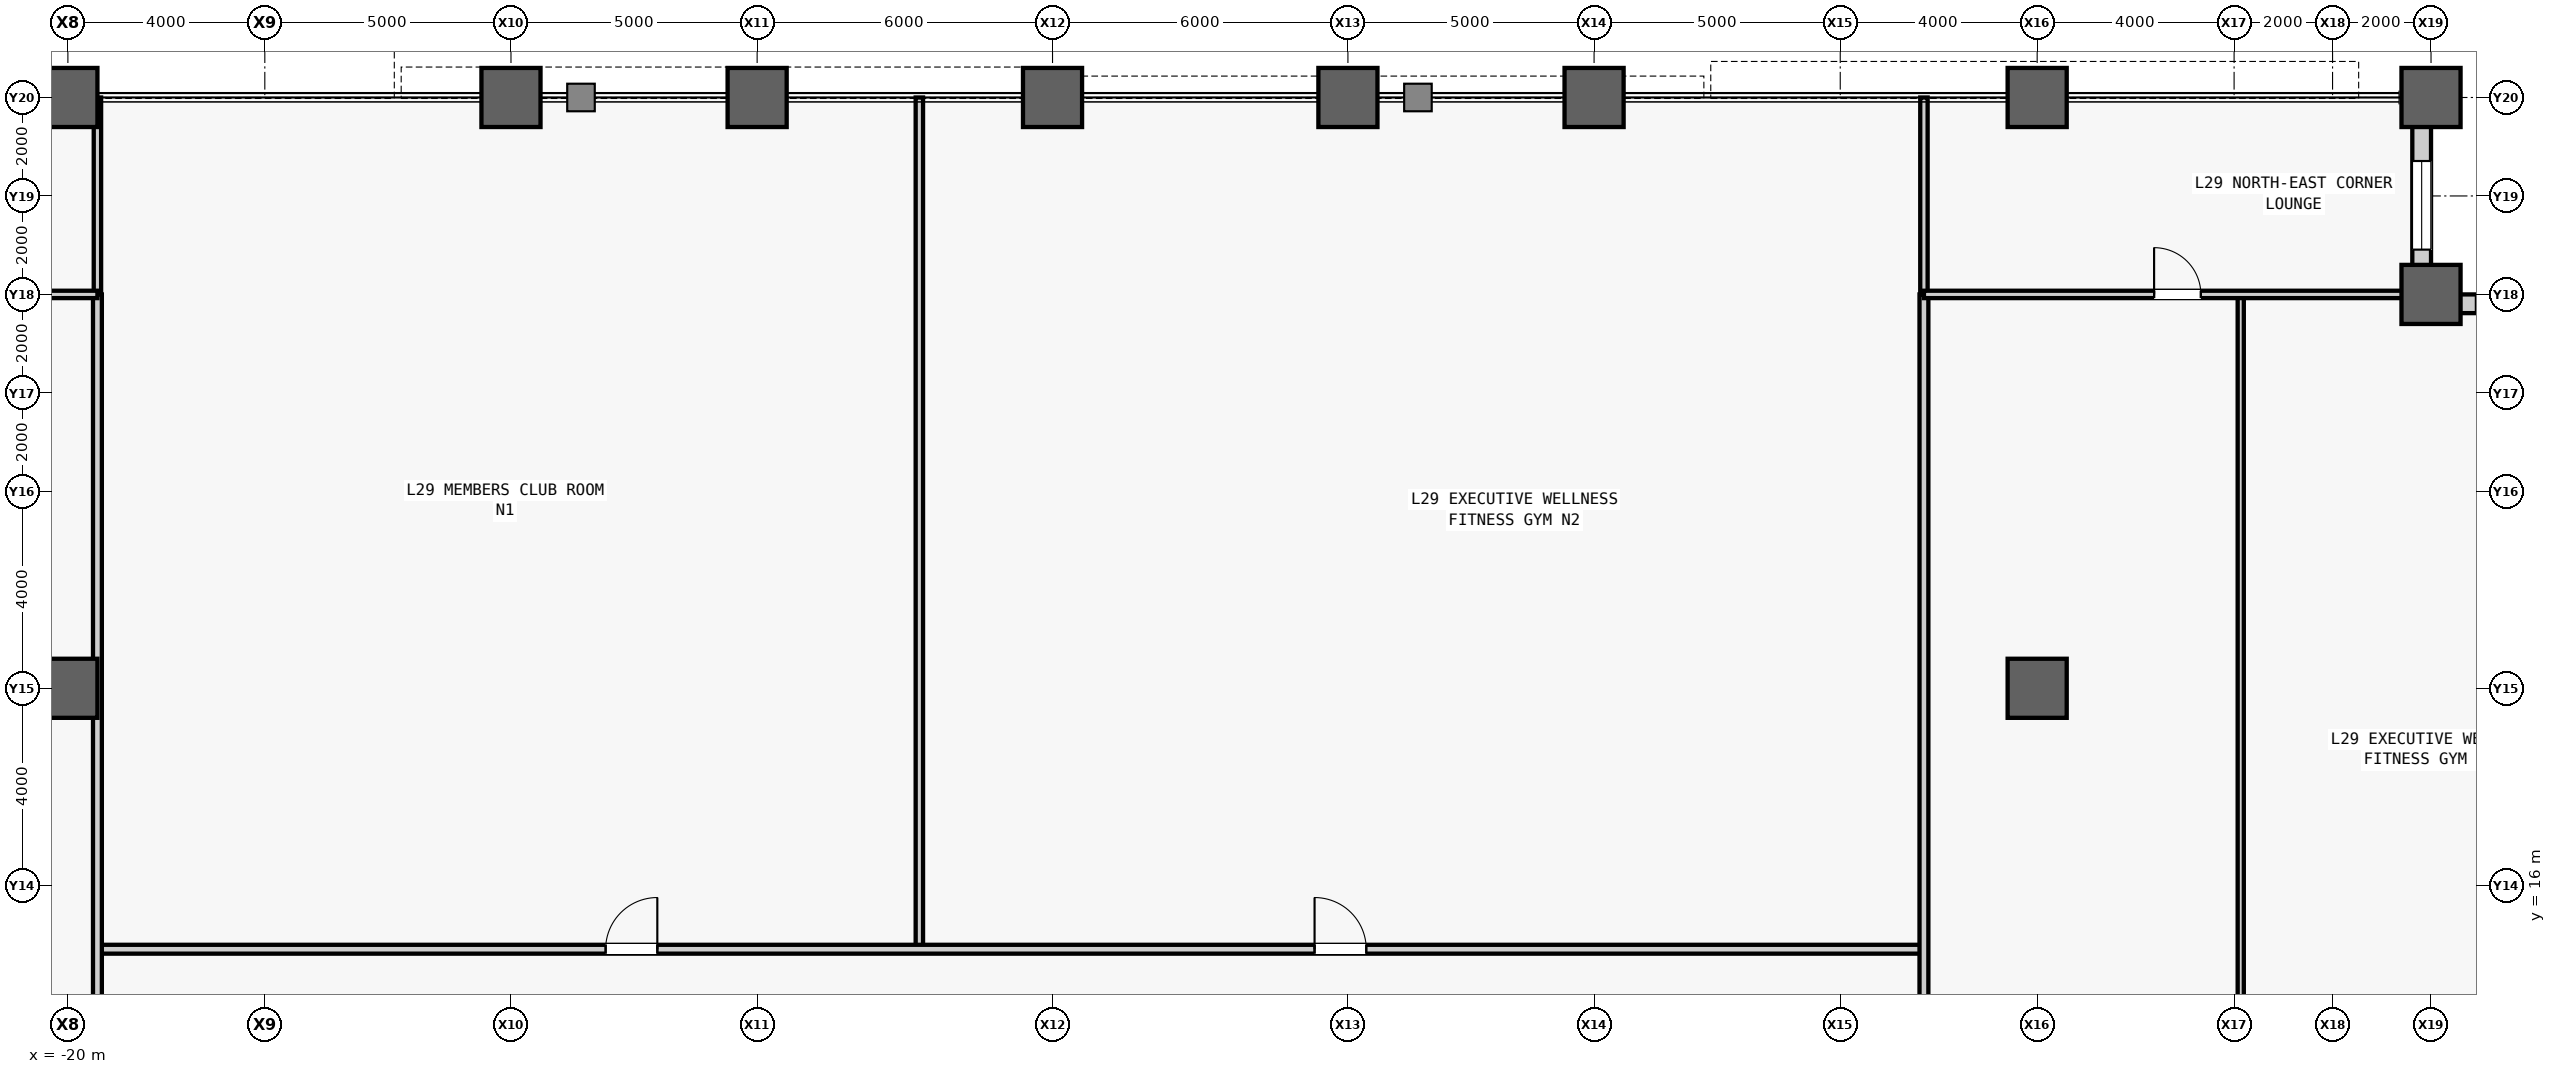
"""IFC4 building model, lengths in metres.
Left out: names, types, materials, properties, quantities, classifications, styles, units other than length and angle.
Written with IfcOpenShell. Run it as: python <this file> out.ifc"""

import sys

from ifc_helpers import new_model, si_unit, direction, frame, frame_2d, origin, origin_2d, place, context, subcontext, project, spatial, rectangle, hollow_rectangle, extrude, source, transform, mapped, element, fill, save


model = new_model("IFC4")
c1 = context("Model", 3, precision=1e-05, world=origin(), true_north=direction((0.0, 1.0)))
c2 = subcontext(c1, "Body", "Model", "MODEL_VIEW")
j1 = project(units=[si_unit("LENGTHUNIT", "METRE"), si_unit("PLANEANGLEUNIT", "RADIAN")], contexts=[c1])
p1 = place(None, origin())
s1 = spatial("IfcSite", under=j1, at=p1, CompositionType="ELEMENT")
p2 = place(p1, origin())
s2 = spatial("IfcBuilding", under=s1, at=p2, CompositionType="ELEMENT")
p3 = place(p2, frame((0.0, 0.0, 128.3)))
s3 = spatial("IfcBuildingStorey", under=s2, at=p3, CompositionType="ELEMENT", Elevation=128.3)
m1 = source(origin(), c2, "Body", "SweptSolid", [
    extrude(hollow_rectangle(XDim=1.2, YDim=1.2, WallThickness=0.07, at=origin_2d()), origin(), (0.0, 0.0, 1.0), 4.1),
])
for number, where, z_axis, x_axis in (
    (1, (-20.0, 20.0, 0.0), (0.0, 0.0, 1.0), (1.0, 0.0, 0.0)),
    (2, (-20.0, 32.0, 0.0), (0.0, 0.0, 1.0), (1.0, 0.0, 0.0)),
    (3, (-11.0, 32.0, 0.0), (0.0, 0.0, 1.0), (1.0, 0.0, 0.0)),
    (4, (-6.0, 32.0, 0.0), (0.0, 0.0, 1.0), (1.0, 0.0, 0.0)),
    (5, (0.0, 32.0, 0.0), (0.0, 0.0, 1.0), (1.0, 0.0, 0.0)),
    (6, (6.0, 32.0, 0.0), (0.0, 0.0, 1.0), (1.0, 0.0, 0.0)),
    (7, (11.0, 32.0, 0.0), (0.0, 0.0, 1.0), (1.0, 0.0, 0.0)),
    (8, (20.0, 20.0, 0.0), (0.0, 0.0, 1.0), (1.0, 0.0, 0.0)),
    (9, (20.0, 32.0, 0.0), (0.0, 0.0, 1.0), (1.0, 0.0, 0.0)),
    (10, (28.0, 28.0, 0.0), (0.0, 0.0, 1.0), (1.0, 0.0, 0.0)),
    (11, (28.0, 32.0, 0.0), (0.0, 0.0, 1.0), (1.0, 0.0, 0.0)),
):
    element("IfcColumn", number, at=place(p3, frame(where, z_axis=z_axis, x_axis=x_axis)), inside=s3, PredefinedType="COLUMN", context=c2, shape_type="MappedRepresentation", body=[
        mapped(m1, transform((0.0, 0.0, 0.0), scale=1.0)),
    ])
m2 = source(origin(), c2, "Body", "SweptSolid", [
    extrude(rectangle(XDim=3.62, YDim=0.38, at=frame_2d((1.81, 0.0))), origin(), (0.0, 0.0, 1.0), 3.145),
])
p4 = place(p3, frame((28.0, 27.81, 0.0), z_axis=(0.0, 0.0, 1.0), x_axis=(1.0, 0.0, 0.0)))
e12 = element("IfcWall", 12, at=p4, inside=s3, PredefinedType="STANDARD", context=c2, shape_type="MappedRepresentation", body=[
    mapped(m2, transform((0.0, 0.0, 0.0), scale=1.0)),
])
m3 = source(origin(), c2, "Body", "SweptSolid", [
    extrude(rectangle(XDim=1.8, YDim=2.4, at=frame_2d((0.9, 1.2))), frame((0.0, 0.2, 0.0), z_axis=(0.0, -1.0, 0.0), x_axis=(1.0, 0.0, 0.0)), (0.0, 0.0, 1.0), 0.4),
])
p5 = place(p4, frame((0.91, 0.0, 0.5)))
e13 = element("IfcOpeningElement", 13, at=p5, cuts=e12, PredefinedType="OPENING", context=c2, shape_type="MappedRepresentation", body=[
    mapped(m3, transform((0.0, 0.0, 0.0), scale=1.0)),
])
p6 = place(p3, frame((27.81, 28.0, 0.0), z_axis=(0.0, 0.0, 1.0), x_axis=(0.0, 1.0, 0.0)))
e14 = element("IfcWall", 14, at=p6, inside=s3, PredefinedType="STANDARD", context=c2, shape_type="MappedRepresentation", body=[
    mapped(m2, transform((0.0, 0.0, 0.0), scale=1.0)),
])
p7 = place(p6, frame((0.91, 0.0, 0.5)))
e15 = element("IfcOpeningElement", 15, at=p7, cuts=e14, PredefinedType="OPENING", context=c2, shape_type="MappedRepresentation", body=[
    mapped(m3, transform((0.0, 0.0, 0.0), scale=1.0)),
])
m4 = source(origin(), c2, "Body", "SweptSolid", [
    extrude(rectangle(XDim=17.3, YDim=0.15, at=frame_2d((8.65, 0.0))), origin(), (0.0, 0.0, 1.0), 3.84),
])
p8 = place(p3, frame((-2.705, 14.7, 0.0), z_axis=(0.0, 0.0, 1.0), x_axis=(0.0, 1.0, 0.0)))
e16 = element("IfcWall", 16, at=p8, inside=s3, PredefinedType="PARTITIONING", context=c2, shape_type="MappedRepresentation", body=[
    mapped(m4, transform((0.0, 0.0, 0.0), scale=1.0)),
])
m5 = source(origin(), c2, "Body", "SweptSolid", [
    extrude(rectangle(XDim=37.1, YDim=0.18, at=frame_2d((18.55, 0.0))), origin(), (0.0, 0.0, 1.0), 3.84),
])
p9 = place(p3, frame((-19.4, 14.7, 0.0), z_axis=(0.0, 0.0, 1.0), x_axis=(1.0, 0.0, 0.0)))
e17 = element("IfcWall", 17, at=p9, inside=s3, PredefinedType="PARTITIONING", context=c2, shape_type="MappedRepresentation", body=[
    mapped(m5, transform((0.0, 0.0, 0.0), scale=1.0)),
])
m6 = source(origin(), c2, "Body", "SweptSolid", [
    extrude(rectangle(XDim=1.05, YDim=2.2, at=frame_2d((0.525, 1.1))), frame((0.0, 0.1, 0.0), z_axis=(0.0, -1.0, 0.0), x_axis=(1.0, 0.0, 0.0)), (0.0, 0.0, 1.0), 0.2),
])
p10 = place(p9, frame((10.323, 0.0, 0.0)))
e18 = element("IfcOpeningElement", 18, at=p10, cuts=e17, PredefinedType="OPENING", context=c2, shape_type="MappedRepresentation", body=[
    mapped(m6, transform((0.0, 0.0, 0.0), scale=1.0)),
])
p11 = place(p9, frame((24.722, 0.0, 0.0)))
e19 = element("IfcOpeningElement", 19, at=p11, cuts=e17, PredefinedType="OPENING", context=c2, shape_type="MappedRepresentation", body=[
    mapped(m6, transform((0.0, 0.0, 0.0), scale=1.0)),
])
m7 = source(origin(), c2, "Body", "SweptSolid", [
    extrude(rectangle(XDim=4.0, YDim=0.15, at=frame_2d((2.0, 0.0))), origin(), (0.0, 0.0, 1.0), 3.84),
])
for number, where, z_axis, x_axis in (
    (20, (-19.4, 28.0, 0.0), (0.0, 0.0, 1.0), (0.0, 1.0, 0.0)),
    (21, (17.7, 28.0, 0.0), (0.0, 0.0, 1.0), (0.0, 1.0, 0.0)),
):
    element("IfcWall", number, at=place(p3, frame(where, z_axis=z_axis, x_axis=x_axis)), inside=s3, PredefinedType="PARTITIONING", context=c2, shape_type="MappedRepresentation", body=[
        mapped(m7, transform((0.0, 0.0, 0.0), scale=1.0)),
    ])
m8 = source(origin(), c2, "Body", "SweptSolid", [
    extrude(rectangle(XDim=56.0, YDim=0.18, at=frame_2d((28.0, 0.0))), origin(), (0.0, 0.0, 1.0), 3.371),
])
p12 = place(p3, frame((-19.4, -28.0, 0.0), z_axis=(0.0, 0.0, 1.0), x_axis=(0.0, 1.0, 0.0)))
e22 = element("IfcWall", 22, at=p12, inside=s3, PredefinedType="PARTITIONING", context=c2, shape_type="MappedRepresentation", body=[
    mapped(m8, transform((0.0, 0.0, 0.0), scale=1.0)),
])
m9 = source(origin(), c2, "Body", "SweptSolid", [
    extrude(rectangle(XDim=0.95, YDim=2.15, at=frame_2d((0.475, 1.075))), frame((0.0, 0.1, 0.0), z_axis=(0.0, -1.0, 0.0), x_axis=(1.0, 0.0, 0.0)), (0.0, 0.0, 1.0), 0.2),
])
p13 = place(p12, frame((16.8, 0.0, 0.0)))
e23 = element("IfcOpeningElement", 23, at=p13, cuts=e22, PredefinedType="OPENING", context=c2, shape_type="MappedRepresentation", body=[
    mapped(m9, transform((0.0, 0.0, 0.0), scale=1.0)),
])
p14 = place(p12, frame((24.732, 0.0, 0.0)))
e24 = element("IfcOpeningElement", 24, at=p14, cuts=e22, PredefinedType="OPENING", context=c2, shape_type="MappedRepresentation", body=[
    mapped(m9, transform((0.0, 0.0, 0.0), scale=1.0)),
])
p15 = place(p12, frame((33.111, 0.0, 0.0)))
e25 = element("IfcOpeningElement", 25, at=p15, cuts=e22, PredefinedType="OPENING", context=c2, shape_type="MappedRepresentation", body=[
    mapped(m9, transform((0.0, 0.0, 0.0), scale=1.0)),
])
p16 = place(p12, frame((39.279, 0.0, 0.0)))
e26 = element("IfcOpeningElement", 26, at=p16, cuts=e22, PredefinedType="OPENING", context=c2, shape_type="MappedRepresentation", body=[
    mapped(m9, transform((0.0, 0.0, 0.0), scale=1.0)),
])
m10 = source(origin(), c2, "Body", "SweptSolid", [
    extrude(rectangle(XDim=24.472, YDim=0.125, at=frame_2d((12.236, 0.0))), origin(), (0.0, 0.0, 1.0), 3.84),
])
p17 = place(p3, frame((24.135, 3.528, 0.0), z_axis=(0.0, 0.0, 1.0), x_axis=(0.0, 1.0, 0.0)))
e27 = element("IfcWall", 27, at=p17, inside=s3, PredefinedType="PARTITIONING", context=c2, shape_type="MappedRepresentation", body=[
    mapped(m10, transform((0.0, 0.0, 0.0), scale=1.0)),
])
m11 = source(origin(), c2, "Body", "SweptSolid", [
    extrude(rectangle(XDim=0.95, YDim=2.15, at=frame_2d((0.475, 1.075))), frame((0.0, 0.073, 0.0), z_axis=(0.0, -1.0, 0.0), x_axis=(1.0, 0.0, 0.0)), (0.0, 0.0, 1.0), 0.145),
])
p18 = place(p17, frame((5.111, 0.0, 0.0)))
e28 = element("IfcOpeningElement", 28, at=p18, cuts=e27, PredefinedType="OPENING", context=c2, shape_type="MappedRepresentation", body=[
    mapped(m11, transform((0.0, 0.0, 0.0), scale=1.0)),
])
m12 = source(origin(), c2, "Body", "SweptSolid", [
    extrude(rectangle(XDim=56.0, YDim=0.18, at=frame_2d((28.0, 0.0))), origin(), (0.0, 0.0, 1.0), 3.84),
])
p19 = place(p3, frame((17.7, -28.0, 0.0), z_axis=(0.0, 0.0, 1.0), x_axis=(0.0, 1.0, 0.0)))
e29 = element("IfcWall", 29, at=p19, inside=s3, PredefinedType="PARTITIONING", context=c2, shape_type="MappedRepresentation", body=[
    mapped(m12, transform((0.0, 0.0, 0.0), scale=1.0)),
])
p20 = place(p19, frame((17.241, 0.0, 0.0)))
e30 = element("IfcOpeningElement", 30, at=p20, cuts=e29, PredefinedType="OPENING", context=c2, shape_type="MappedRepresentation", body=[
    mapped(m9, transform((0.0, 0.0, 0.0), scale=1.0)),
])
p21 = place(p19, frame((26.055, 0.0, 0.0)))
e31 = element("IfcOpeningElement", 31, at=p21, cuts=e29, PredefinedType="OPENING", context=c2, shape_type="MappedRepresentation", body=[
    mapped(m9, transform((0.0, 0.0, 0.0), scale=1.0)),
])
p22 = place(p19, frame((36.339, 0.0, 0.0)))
e32 = element("IfcOpeningElement", 32, at=p22, cuts=e29, PredefinedType="OPENING", context=c2, shape_type="MappedRepresentation", body=[
    mapped(m9, transform((0.0, 0.0, 0.0), scale=1.0)),
])
m13 = source(origin(), c2, "Body", "SweptSolid", [
    extrude(rectangle(XDim=8.6, YDim=0.15, at=frame_2d((4.3, 0.0))), origin(), (0.0, 0.0, 1.0), 3.84),
])
p23 = place(p3, frame((-28.0, 28.0, 0.0), z_axis=(0.0, 0.0, 1.0), x_axis=(1.0, 0.0, 0.0)))
e33 = element("IfcWall", 33, at=p23, inside=s3, PredefinedType="PARTITIONING", context=c2, shape_type="MappedRepresentation", body=[
    mapped(m13, transform((0.0, 0.0, 0.0), scale=1.0)),
])
m14 = source(origin(), c2, "Body", "SweptSolid", [
    extrude(rectangle(XDim=0.95, YDim=2.15, at=frame_2d((0.475, 1.075))), frame((0.0, 0.085, 0.0), z_axis=(0.0, -1.0, 0.0), x_axis=(1.0, 0.0, 0.0)), (0.0, 0.0, 1.0), 0.17),
])
p24 = place(p23, frame((3.825, 0.0, 0.0)))
e34 = element("IfcOpeningElement", 34, at=p24, cuts=e33, PredefinedType="OPENING", context=c2, shape_type="MappedRepresentation", body=[
    mapped(m14, transform((0.0, 0.0, 0.0), scale=1.0)),
])
m15 = source(origin(), c2, "Body", "SweptSolid", [
    extrude(rectangle(XDim=10.3, YDim=0.15, at=frame_2d((5.15, 0.0))), origin(), (0.0, 0.0, 1.0), 3.84),
])
p25 = place(p3, frame((17.7, 28.0, 0.0), z_axis=(0.0, 0.0, 1.0), x_axis=(1.0, 0.0, 0.0)))
e35 = element("IfcWall", 35, at=p25, inside=s3, PredefinedType="PARTITIONING", context=c2, shape_type="MappedRepresentation", body=[
    mapped(m15, transform((0.0, 0.0, 0.0), scale=1.0)),
])
p26 = place(p25, frame((4.675, 0.0, 0.0)))
e36 = element("IfcOpeningElement", 36, at=p26, cuts=e35, PredefinedType="OPENING", context=c2, shape_type="MappedRepresentation", body=[
    mapped(m14, transform((0.0, 0.0, 0.0), scale=1.0)),
])
m16 = source(origin(), c2, "Body", "SweptSolid", [
    extrude(rectangle(XDim=1.8, YDim=2.4, at=frame_2d((0.9, 1.2))), frame((0.0, 0.03, 0.0), z_axis=(0.0, -1.0, 0.0), x_axis=(1.0, 0.0, 0.0)), (0.0, 0.0, 1.0), 0.06),
])
p27 = place(p5, origin())
e37 = element("IfcWindow", 37, at=p27, inside=s3, PartitioningType="SINGLE_PANEL", PredefinedType="WINDOW", context=c2, shape_type="MappedRepresentation", body=[
    mapped(m16, transform((0.0, 0.0, 0.0), scale=1.0)),
])
fill(e13, e37)
p28 = place(p7, origin())
e38 = element("IfcWindow", 38, at=p28, inside=s3, PartitioningType="SINGLE_PANEL", PredefinedType="WINDOW", context=c2, shape_type="MappedRepresentation", body=[
    mapped(m16, transform((0.0, 0.0, 0.0), scale=1.0)),
])
fill(e15, e38)
m17 = source(origin(), c2, "Body", "SweptSolid", [
    extrude(rectangle(XDim=1.05, YDim=2.2, at=frame_2d((0.525, 1.1))), frame((0.0, 0.025, 0.0), z_axis=(0.0, -1.0, 0.0), x_axis=(1.0, 0.0, 0.0)), (0.0, 0.0, 1.0), 0.05),
])
p29 = place(p10, origin())
e39 = element("IfcDoor", 39, at=p29, inside=s3, OperationType="SINGLE_SWING_RIGHT", PredefinedType="DOOR", context=c2, shape_type="MappedRepresentation", body=[
    mapped(m17, transform((0.0, 0.0, 0.0), scale=1.0)),
])
fill(e18, e39)
p30 = place(p11, origin())
e40 = element("IfcDoor", 40, at=p30, inside=s3, OperationType="SINGLE_SWING_LEFT", PredefinedType="DOOR", context=c2, shape_type="MappedRepresentation", body=[
    mapped(m17, transform((0.0, 0.0, 0.0), scale=1.0)),
])
fill(e19, e40)
m18 = source(origin(), c2, "Body", "SweptSolid", [
    extrude(rectangle(XDim=0.95, YDim=2.15, at=frame_2d((0.475, 1.075))), frame((0.0, 0.025, 0.0), z_axis=(0.0, -1.0, 0.0), x_axis=(1.0, 0.0, 0.0)), (0.0, 0.0, 1.0), 0.05),
])
p31 = place(p26, origin())
e41 = element("IfcDoor", 41, at=p31, inside=s3, OperationType="SINGLE_SWING_LEFT", PredefinedType="DOOR", context=c2, shape_type="MappedRepresentation", body=[
    mapped(m18, transform((0.0, 0.0, 0.0), scale=1.0)),
])
fill(e36, e41)
save(model, sys.argv[1])
